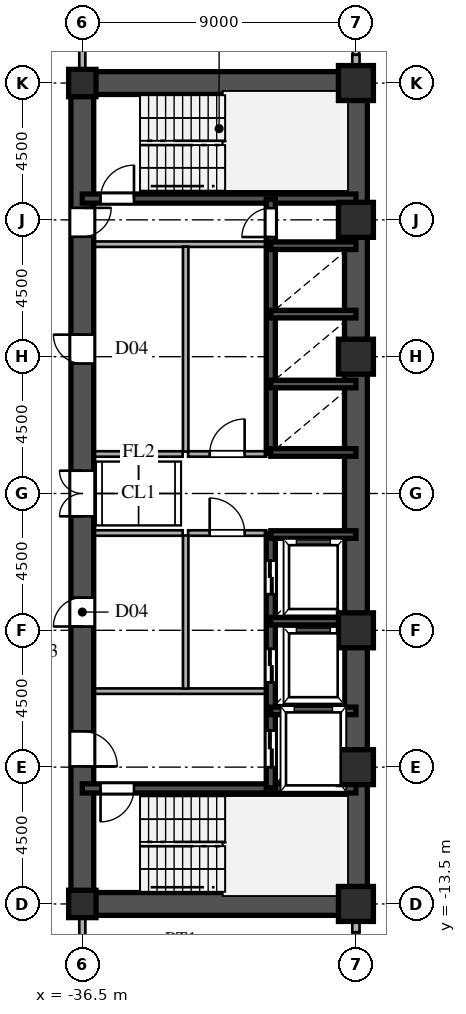
"""IFC4 building model, lengths in metres.
Left out: names, types, materials, properties, quantities, classifications, styles, units other than length and angle.
Written with IfcOpenShell. Run it as: python <this file> out.ifc"""

import sys

from ifc_helpers import new_model, si_unit, direction, frame, frame_2d, origin, origin_2d, place, context, subcontext, project, spatial, rectangle, hollow_rectangle, i_section, extrude, source, transform, mapped, element, fill, save


model = new_model("IFC4")
c1 = context("Model", 3, precision=1e-05, world=origin(), true_north=direction((0.0, 1.0)))
c2 = subcontext(c1, "Body", "Model", "MODEL_VIEW")
j1 = project(units=[si_unit("LENGTHUNIT", "METRE"), si_unit("PLANEANGLEUNIT", "RADIAN")], contexts=[c1])
p1 = place(None, origin())
s1 = spatial("IfcSite", under=j1, at=p1, CompositionType="ELEMENT")
p2 = place(p1, origin())
s2 = spatial("IfcBuilding", under=s1, at=p2, CompositionType="ELEMENT")
p3 = place(p2, frame((0.0, 0.0, 40.5)))
s3 = spatial("IfcBuildingStorey", under=s2, at=p3, CompositionType="ELEMENT", Elevation=40.5)
m1 = source(origin(), c2, "Body", "SweptSolid", [
    extrude(hollow_rectangle(XDim=1.15, YDim=1.15, WallThickness=0.048, at=origin_2d()), origin(), (0.0, 0.0, 1.0), 3.6),
])
for number, where, z_axis, x_axis in (
    (1, (-27.5, -13.5, 0.0), (0.0, 0.0, 1.0), (1.0, 0.0, 0.0)),
    (2, (-27.5, -9.0, 0.0), (0.0, 0.0, 1.0), (1.0, 0.0, 0.0)),
    (3, (-27.5, -4.5, 0.0), (0.0, 0.0, 1.0), (1.0, 0.0, 0.0)),
    (4, (-27.5, 4.5, 0.0), (0.0, 0.0, 1.0), (1.0, 0.0, 0.0)),
    (5, (-27.5, 9.0, 0.0), (0.0, 0.0, 1.0), (1.0, 0.0, 0.0)),
    (6, (-27.5, 13.5, 0.0), (0.0, 0.0, 1.0), (1.0, 0.0, 0.0)),
):
    element("IfcColumn", number, at=place(p3, frame(where, z_axis=z_axis, x_axis=x_axis)), inside=s3, PredefinedType="COLUMN", context=c2, shape_type="MappedRepresentation", body=[
        mapped(m1, transform((0.0, 0.0, 0.0), scale=1.0)),
    ])
m2 = source(origin(), c2, "Body", "SweptSolid", [
    extrude(i_section(OverallWidth=0.9, OverallDepth=0.9, WebThickness=0.036, FlangeThickness=0.055, at=origin_2d()), origin(), (0.0, 0.0, 1.0), 3.6),
])
for number, where, z_axis, x_axis in (
    (7, (-36.5, -13.5, 0.0), (0.0, 0.0, 1.0), (1.0, 0.0, 0.0)),
    (8, (-36.5, 13.5, 0.0), (0.0, 0.0, 1.0), (1.0, 0.0, 0.0)),
):
    element("IfcColumn", number, at=place(p3, frame(where, z_axis=z_axis, x_axis=x_axis)), inside=s3, PredefinedType="COLUMN", context=c2, shape_type="MappedRepresentation", body=[
        mapped(m2, transform((0.0, 0.0, 0.0), scale=1.0)),
    ])
for number, where, z_axis, x_axis in (
    (9, (-27.5, -14.43, 0.0), (0.0, 0.0, 1.0), (0.0, 1.0, 0.0)),
    (10, (-27.5, 13.88, 0.0), (0.0, 0.0, 1.0), (0.0, 1.0, 0.0)),
):
    element("IfcWall", number, at=place(p3, frame(where, z_axis=z_axis, x_axis=x_axis)), inside=s3, PredefinedType="SOLIDWALL", context=c2, shape_type="SweptSolid", body=[
        extrude(rectangle(XDim=0.55, YDim=0.24, at=frame_2d((0.275, 0.0))), origin(), (0.0, 0.0, 1.0), 2.88),
    ])
for number, where, z_axis, x_axis in (
    (11, (-27.5, -13.5, 0.0), (0.0, 0.0, 1.0), (0.0, 1.0, 0.0)),
    (12, (-27.5, 1.3, 0.0), (0.0, 0.0, 1.0), (0.0, 1.0, 0.0)),
):
    element("IfcWall", number, at=place(p3, frame(where, z_axis=z_axis, x_axis=x_axis)), inside=s3, PredefinedType="SHEAR", context=c2, shape_type="SweptSolid", body=[
        extrude(rectangle(XDim=12.2, YDim=0.75, at=frame_2d((6.1, 0.0))), origin(), (0.0, 0.0, 1.0), 3.38),
    ])
p4 = place(p3, frame((-27.5, -1.3, 0.0), z_axis=(0.0, 0.0, 1.0), x_axis=(0.0, 1.0, 0.0)))
e13 = element("IfcWall", 13, at=p4, inside=s3, PredefinedType="SHEAR", context=c2, shape_type="SweptSolid", body=[
    extrude(rectangle(XDim=2.6, YDim=0.75, at=frame_2d((1.3, 0.0))), origin(), (0.0, 0.0, 1.0), 3.38),
])
for number, where, z_axis, x_axis in (
    (14, (-36.5, -13.5, 0.0), (0.0, 0.0, 1.0), (1.0, 0.0, 0.0)),
    (15, (-36.5, 13.5, 0.0), (0.0, 0.0, 1.0), (1.0, 0.0, 0.0)),
):
    element("IfcWall", number, at=place(p3, frame(where, z_axis=z_axis, x_axis=x_axis)), inside=s3, PredefinedType="SHEAR", context=c2, shape_type="SweptSolid", body=[
        extrude(rectangle(XDim=9.0, YDim=0.75, at=frame_2d((4.5, 0.0))), origin(), (0.0, 0.0, 1.0), 3.38),
    ])
p5 = place(p3, frame((-36.5, -13.65, 0.0), z_axis=(0.0, 0.0, 1.0), x_axis=(0.0, 1.0, 0.0)))
e16 = element("IfcWall", 16, at=p5, inside=s3, PredefinedType="SHEAR", context=c2, shape_type="SweptSolid", body=[
    extrude(rectangle(XDim=7.15, YDim=0.75, at=frame_2d((3.575, 0.0))), origin(), (0.0, 0.0, 1.0), 3.38),
])
p6 = place(p5, frame((4.675, 0.0, 0.0)))
e17 = element("IfcOpeningElement", 17, at=p6, cuts=e16, PredefinedType="OPENING", context=c2, shape_type="SweptSolid", body=[
    extrude(rectangle(XDim=1.15, YDim=2.2, at=frame_2d((0.575, 1.1))), frame((0.0, 0.385, 0.0), z_axis=(0.0, -1.0, 0.0), x_axis=(1.0, 0.0, 0.0)), (0.0, 0.0, 1.0), 0.77),
])
p7 = place(p3, frame((-36.5, -1.3, 0.0), z_axis=(0.0, 0.0, 1.0), x_axis=(0.0, 1.0, 0.0)))
e18 = element("IfcWall", 18, at=p7, inside=s3, PredefinedType="SHEAR", context=c2, shape_type="SweptSolid", body=[
    extrude(rectangle(XDim=2.6, YDim=0.75, at=frame_2d((1.3, 0.0))), origin(), (0.0, 0.0, 1.0), 3.38),
])
p8 = place(p7, frame((0.55, 0.0, 0.0)))
e19 = element("IfcOpeningElement", 19, at=p8, cuts=e18, PredefinedType="OPENING", context=c2, shape_type="SweptSolid", body=[
    extrude(rectangle(XDim=1.5, YDim=2.3, at=frame_2d((0.75, 1.15))), frame((0.0, 0.385, 0.0), z_axis=(0.0, -1.0, 0.0), x_axis=(1.0, 0.0, 0.0)), (0.0, 0.0, 1.0), 0.77),
])
p9 = place(p3, frame((-36.5, 8.2, 0.0), z_axis=(0.0, 0.0, 1.0), x_axis=(0.0, 1.0, 0.0)))
e20 = element("IfcWall", 20, at=p9, inside=s3, PredefinedType="SHEAR", context=c2, shape_type="SweptSolid", body=[
    extrude(rectangle(XDim=5.45, YDim=0.75, at=frame_2d((2.725, 0.0))), origin(), (0.0, 0.0, 1.0), 3.38),
])
p10 = place(p9, frame((0.245, 0.0, 0.0)))
e21 = element("IfcOpeningElement", 21, at=p10, cuts=e20, PredefinedType="OPENING", context=c2, shape_type="SweptSolid", body=[
    extrude(rectangle(XDim=0.95, YDim=2.15, at=frame_2d((0.475, 1.075))), frame((0.0, 0.385, 0.0), z_axis=(0.0, -1.0, 0.0), x_axis=(1.0, 0.0, 0.0)), (0.0, 0.0, 1.0), 0.77),
])
p11 = place(p3, frame((-36.5, -6.5, 0.0), z_axis=(0.0, 0.0, 1.0), x_axis=(0.0, 1.0, 0.0)))
e22 = element("IfcWall", 22, at=p11, inside=s3, PredefinedType="SHEAR", context=c2, shape_type="SweptSolid", body=[
    extrude(rectangle(XDim=5.2, YDim=0.75, at=frame_2d((2.6, 0.0))), origin(), (0.0, 0.0, 1.0), 3.38),
])
p12 = place(p11, frame((2.125, 0.0, 0.0)))
e23 = element("IfcOpeningElement", 23, at=p12, cuts=e22, PredefinedType="OPENING", context=c2, shape_type="SweptSolid", body=[
    extrude(rectangle(XDim=0.95, YDim=2.15, at=frame_2d((0.475, 1.075))), frame((0.0, 0.385, 0.0), z_axis=(0.0, -1.0, 0.0), x_axis=(1.0, 0.0, 0.0)), (0.0, 0.0, 1.0), 0.77),
])
p13 = place(p3, frame((-36.5, 1.3, 0.0), z_axis=(0.0, 0.0, 1.0), x_axis=(0.0, 1.0, 0.0)))
e24 = element("IfcWall", 24, at=p13, inside=s3, PredefinedType="SHEAR", context=c2, shape_type="SweptSolid", body=[
    extrude(rectangle(XDim=6.9, YDim=0.75, at=frame_2d((3.45, 0.0))), origin(), (0.0, 0.0, 1.0), 3.38),
])
p14 = place(p13, frame((2.975, 0.0, 0.0)))
e25 = element("IfcOpeningElement", 25, at=p14, cuts=e24, PredefinedType="OPENING", context=c2, shape_type="SweptSolid", body=[
    extrude(rectangle(XDim=0.95, YDim=2.15, at=frame_2d((0.475, 1.075))), frame((0.0, 0.385, 0.0), z_axis=(0.0, -1.0, 0.0), x_axis=(1.0, 0.0, 0.0)), (0.0, 0.0, 1.0), 0.77),
])
p15 = place(p3, frame((-36.5, -9.7, 0.0), z_axis=(0.0, 0.0, 1.0), x_axis=(1.0, 0.0, 0.0)))
e26 = element("IfcWall", 26, at=p15, inside=s3, PredefinedType="SHEAR", context=c2, shape_type="SweptSolid", body=[
    extrude(rectangle(XDim=9.0, YDim=0.3, at=frame_2d((4.5, 0.0))), origin(), (0.0, 0.0, 1.0), 3.38),
])
p16 = place(p15, frame((0.6, 0.0, 0.0)))
e27 = element("IfcOpeningElement", 27, at=p16, cuts=e26, PredefinedType="OPENING", context=c2, shape_type="SweptSolid", body=[
    extrude(rectangle(XDim=1.1, YDim=2.2, at=frame_2d((0.55, 1.1))), frame((0.0, 0.16, 0.0), z_axis=(0.0, -1.0, 0.0), x_axis=(1.0, 0.0, 0.0)), (0.0, 0.0, 1.0), 0.32),
])
p17 = place(p3, frame((-36.5, 9.7, 0.0), z_axis=(0.0, 0.0, 1.0), x_axis=(1.0, 0.0, 0.0)))
e28 = element("IfcWall", 28, at=p17, inside=s3, PredefinedType="SHEAR", context=c2, shape_type="SweptSolid", body=[
    extrude(rectangle(XDim=9.0, YDim=0.3, at=frame_2d((4.5, 0.0))), origin(), (0.0, 0.0, 1.0), 3.38),
])
p18 = place(p17, frame((0.6, 0.0, 0.0)))
e29 = element("IfcOpeningElement", 29, at=p18, cuts=e28, PredefinedType="OPENING", context=c2, shape_type="SweptSolid", body=[
    extrude(rectangle(XDim=1.1, YDim=2.2, at=frame_2d((0.55, 1.1))), frame((0.0, 0.16, 0.0), z_axis=(0.0, -1.0, 0.0), x_axis=(1.0, 0.0, 0.0)), (0.0, 0.0, 1.0), 0.32),
])
for number, where, z_axis, x_axis in (
    (30, (-30.3, -7.15, 0.0), (0.0, 0.0, 1.0), (1.0, 0.0, 0.0)),
    (31, (-30.3, -4.2, 0.0), (0.0, 0.0, 1.0), (1.0, 0.0, 0.0)),
    (32, (-30.3, -1.35, 0.0), (0.0, 0.0, 1.0), (1.0, 0.0, 0.0)),
    (33, (-30.3, 1.35, 0.0), (0.0, 0.0, 1.0), (1.0, 0.0, 0.0)),
    (34, (-30.3, 3.6, 0.0), (0.0, 0.0, 1.0), (1.0, 0.0, 0.0)),
    (35, (-30.3, 5.9, 0.0), (0.0, 0.0, 1.0), (1.0, 0.0, 0.0)),
    (36, (-30.3, 8.15, 0.0), (0.0, 0.0, 1.0), (1.0, 0.0, 0.0)),
):
    element("IfcWall", number, at=place(p3, frame(where, z_axis=z_axis, x_axis=x_axis)), inside=s3, PredefinedType="SHEAR", context=c2, shape_type="SweptSolid", body=[
        extrude(rectangle(XDim=2.8, YDim=0.25, at=frame_2d((1.4, 0.0))), origin(), (0.0, 0.0, 1.0), 3.38),
    ])
p19 = place(p3, frame((-30.3, -9.68, 0.0), z_axis=(0.0, 0.0, 1.0), x_axis=(0.0, 1.0, 0.0)))
e37 = element("IfcWall", 37, at=p19, inside=s3, PredefinedType="SHEAR", context=c2, shape_type="SweptSolid", body=[
    extrude(rectangle(XDim=2.56, YDim=0.3, at=frame_2d((1.28, 0.0))), origin(), (0.0, 0.0, 1.0), 3.38),
])
p20 = place(p19, frame((0.68, 0.0, 0.0)))
e38 = element("IfcOpeningElement", 38, at=p20, cuts=e37, PredefinedType="OPENING", context=c2, shape_type="SweptSolid", body=[
    extrude(rectangle(XDim=1.2, YDim=2.25, at=frame_2d((0.6, 1.125))), frame((0.0, 0.16, 0.0), z_axis=(0.0, -1.0, 0.0), x_axis=(1.0, 0.0, 0.0)), (0.0, 0.0, 1.0), 0.32),
])
p21 = place(p3, frame((-30.3, -7.12, 0.0), z_axis=(0.0, 0.0, 1.0), x_axis=(0.0, 1.0, 0.0)))
e39 = element("IfcWall", 39, at=p21, inside=s3, PredefinedType="SHEAR", context=c2, shape_type="SweptSolid", body=[
    extrude(rectangle(XDim=2.92, YDim=0.3, at=frame_2d((1.46, 0.0))), origin(), (0.0, 0.0, 1.0), 3.38),
])
p22 = place(p21, frame((0.91, 0.0, 0.0)))
e40 = element("IfcOpeningElement", 40, at=p22, cuts=e39, PredefinedType="OPENING", context=c2, shape_type="SweptSolid", body=[
    extrude(rectangle(XDim=1.1, YDim=2.2, at=frame_2d((0.55, 1.1))), frame((0.0, 0.16, 0.0), z_axis=(0.0, -1.0, 0.0), x_axis=(1.0, 0.0, 0.0)), (0.0, 0.0, 1.0), 0.32),
])
p23 = place(p3, frame((-30.3, -4.2, 0.0), z_axis=(0.0, 0.0, 1.0), x_axis=(0.0, 1.0, 0.0)))
e41 = element("IfcWall", 41, at=p23, inside=s3, PredefinedType="SHEAR", context=c2, shape_type="SweptSolid", body=[
    extrude(rectangle(XDim=2.88, YDim=0.3, at=frame_2d((1.44, 0.0))), origin(), (0.0, 0.0, 1.0), 3.38),
])
p24 = place(p23, frame((0.89, 0.0, 0.0)))
e42 = element("IfcOpeningElement", 42, at=p24, cuts=e41, PredefinedType="OPENING", context=c2, shape_type="SweptSolid", body=[
    extrude(rectangle(XDim=1.1, YDim=2.2, at=frame_2d((0.55, 1.1))), frame((0.0, 0.16, 0.0), z_axis=(0.0, -1.0, 0.0), x_axis=(1.0, 0.0, 0.0)), (0.0, 0.0, 1.0), 0.32),
])
p25 = place(p3, frame((-30.3, 1.32, 0.0), z_axis=(0.0, 0.0, 1.0), x_axis=(0.0, 1.0, 0.0)))
e43 = element("IfcWall", 43, at=p25, inside=s3, PredefinedType="SHEAR", context=c2, shape_type="SweptSolid", body=[
    extrude(rectangle(XDim=2.28, YDim=0.3, at=frame_2d((1.14, 0.0))), origin(), (0.0, 0.0, 1.0), 3.38),
])
p26 = place(p3, frame((-30.3, 3.6, 0.0), z_axis=(0.0, 0.0, 1.0), x_axis=(0.0, 1.0, 0.0)))
e44 = element("IfcWall", 44, at=p26, inside=s3, PredefinedType="SHEAR", context=c2, shape_type="SweptSolid", body=[
    extrude(rectangle(XDim=2.3, YDim=0.3, at=frame_2d((1.15, 0.0))), origin(), (0.0, 0.0, 1.0), 3.38),
])
p27 = place(p3, frame((-30.3, 5.9, 0.0), z_axis=(0.0, 0.0, 1.0), x_axis=(0.0, 1.0, 0.0)))
e45 = element("IfcWall", 45, at=p27, inside=s3, PredefinedType="SHEAR", context=c2, shape_type="SweptSolid", body=[
    extrude(rectangle(XDim=2.25, YDim=0.3, at=frame_2d((1.125, 0.0))), origin(), (0.0, 0.0, 1.0), 3.38),
])
p28 = place(p3, frame((-30.3, 8.15, 0.0), z_axis=(0.0, 0.0, 1.0), x_axis=(0.0, 1.0, 0.0)))
e46 = element("IfcWall", 46, at=p28, inside=s3, PredefinedType="SHEAR", context=c2, shape_type="SweptSolid", body=[
    extrude(rectangle(XDim=1.53, YDim=0.3, at=frame_2d((0.765, 0.0))), origin(), (0.0, 0.0, 1.0), 3.38),
])
p29 = place(p28, frame((0.285, 0.0, 0.0)))
e47 = element("IfcOpeningElement", 47, at=p29, cuts=e46, PredefinedType="OPENING", context=c2, shape_type="SweptSolid", body=[
    extrude(rectangle(XDim=0.95, YDim=2.15, at=frame_2d((0.475, 1.075))), frame((0.0, 0.16, 0.0), z_axis=(0.0, -1.0, 0.0), x_axis=(1.0, 0.0, 0.0)), (0.0, 0.0, 1.0), 0.32),
])
for number, where, z_axis, x_axis in (
    (48, (-36.15, -6.5, 0.0), (0.0, 0.0, 1.0), (1.0, 0.0, 0.0)),
    (49, (-36.15, 8.2, 0.0), (0.0, 0.0, 1.0), (1.0, 0.0, 0.0)),
):
    element("IfcWall", number, at=place(p3, frame(where, z_axis=z_axis, x_axis=x_axis)), inside=s3, PredefinedType="PARTITIONING", context=c2, shape_type="SweptSolid", body=[
        extrude(rectangle(XDim=5.7, YDim=0.18, at=frame_2d((2.85, 0.0))), origin(), (0.0, 0.0, 1.0), 3.38),
    ])
p30 = place(p3, frame((-33.1, -6.42, 0.0), z_axis=(0.0, 0.0, 1.0), x_axis=(0.0, 1.0, 0.0)))
e50 = element("IfcWall", 50, at=p30, inside=s3, PredefinedType="PARTITIONING", context=c2, shape_type="SweptSolid", body=[
    extrude(rectangle(XDim=5.04, YDim=0.18, at=frame_2d((2.52, 0.0))), origin(), (0.0, 0.0, 1.0), 3.38),
])
p31 = place(p3, frame((-33.1, 1.38, 0.0), z_axis=(0.0, 0.0, 1.0), x_axis=(0.0, 1.0, 0.0)))
e51 = element("IfcWall", 51, at=p31, inside=s3, PredefinedType="PARTITIONING", context=c2, shape_type="SweptSolid", body=[
    extrude(rectangle(XDim=6.74, YDim=0.18, at=frame_2d((3.37, 0.0))), origin(), (0.0, 0.0, 1.0), 3.38),
])
p32 = place(p3, frame((-33.02, -1.3, 0.0), z_axis=(0.0, 0.0, 1.0), x_axis=(1.0, 0.0, 0.0)))
e52 = element("IfcWall", 52, at=p32, inside=s3, PredefinedType="PARTITIONING", context=c2, shape_type="SweptSolid", body=[
    extrude(rectangle(XDim=2.57, YDim=0.18, at=frame_2d((1.285, 0.0))), origin(), (0.0, 0.0, 1.0), 3.38),
])
p33 = place(p32, frame((0.71, 0.0, 0.0)))
e53 = element("IfcOpeningElement", 53, at=p33, cuts=e52, PredefinedType="OPENING", context=c2, shape_type="SweptSolid", body=[
    extrude(rectangle(XDim=1.15, YDim=2.2, at=frame_2d((0.575, 1.1))), frame((0.0, 0.1, 0.0), z_axis=(0.0, -1.0, 0.0), x_axis=(1.0, 0.0, 0.0)), (0.0, 0.0, 1.0), 0.2),
])
p34 = place(p3, frame((-33.02, 1.3, 0.0), z_axis=(0.0, 0.0, 1.0), x_axis=(1.0, 0.0, 0.0)))
e54 = element("IfcWall", 54, at=p34, inside=s3, PredefinedType="PARTITIONING", context=c2, shape_type="SweptSolid", body=[
    extrude(rectangle(XDim=2.57, YDim=0.18, at=frame_2d((1.285, 0.0))), origin(), (0.0, 0.0, 1.0), 3.38),
])
p35 = place(p34, frame((0.71, 0.0, 0.0)))
e55 = element("IfcOpeningElement", 55, at=p35, cuts=e54, PredefinedType="OPENING", context=c2, shape_type="SweptSolid", body=[
    extrude(rectangle(XDim=1.15, YDim=2.2, at=frame_2d((0.575, 1.1))), frame((0.0, 0.1, 0.0), z_axis=(0.0, -1.0, 0.0), x_axis=(1.0, 0.0, 0.0)), (0.0, 0.0, 1.0), 0.2),
])
for number, where, z_axis, x_axis in (
    (56, (-36.15, -1.3, 0.0), (0.0, 0.0, 1.0), (1.0, 0.0, 0.0)),
    (57, (-36.15, 1.3, 0.0), (0.0, 0.0, 1.0), (1.0, 0.0, 0.0)),
):
    element("IfcWall", number, at=place(p3, frame(where, z_axis=z_axis, x_axis=x_axis)), inside=s3, PredefinedType="PARTITIONING", context=c2, shape_type="SweptSolid", body=[
        extrude(rectangle(XDim=2.95, YDim=0.18, at=frame_2d((1.475, 0.0))), origin(), (0.0, 0.0, 1.0), 3.38),
    ])
for number, where, z_axis, x_axis in (
    (58, (-36.5, -15.515, 0.0), (0.0, 0.0, 1.0), (0.0, 1.0, 0.0)),
    (59, (-36.5, 13.88, 0.0), (0.0, 0.0, 1.0), (0.0, 1.0, 0.0)),
):
    element("IfcWall", number, at=place(p3, frame(where, z_axis=z_axis, x_axis=x_axis)), inside=s3, PredefinedType="PARTITIONING", context=c2, shape_type="SweptSolid", body=[
        extrude(rectangle(XDim=1.635, YDim=0.2, at=frame_2d((0.817, 0.0))), origin(), (0.0, 0.0, 1.0), 2.68),
    ])
m3 = source(origin(), c2, "Body", "SweptSolid", [
    extrude(rectangle(XDim=1.15, YDim=2.2, at=frame_2d((0.575, 1.1))), frame((0.0, 0.025, 0.0), z_axis=(0.0, -1.0, 0.0), x_axis=(1.0, 0.0, 0.0)), (0.0, 0.0, 1.0), 0.05),
])
p36 = place(p6, frame((1.15, 0.0, 0.0), z_axis=(0.0, 0.0, 1.0), x_axis=(-1.0, 0.0, 0.0)))
e60 = element("IfcDoor", 60, at=p36, inside=s3, OperationType="SINGLE_SWING_LEFT", PredefinedType="DOOR", context=c2, shape_type="MappedRepresentation", body=[
    mapped(m3, transform((0.0, 0.0, 0.0), scale=1.0)),
])
fill(e17, e60)
m4 = source(origin(), c2, "Body", "SweptSolid", [
    extrude(rectangle(XDim=1.5, YDim=2.3, at=frame_2d((0.75, 1.15))), frame((0.0, 0.025, 0.0), z_axis=(0.0, -1.0, 0.0), x_axis=(1.0, 0.0, 0.0)), (0.0, 0.0, 1.0), 0.05),
])
p37 = place(p8, origin())
e61 = element("IfcDoor", 61, at=p37, inside=s3, OperationType="DOUBLE_SWING_LEFT", PredefinedType="DOOR", context=c2, shape_type="MappedRepresentation", body=[
    mapped(m4, transform((0.0, 0.0, 0.0), scale=1.0)),
])
fill(e19, e61)
m5 = source(origin(), c2, "Body", "SweptSolid", [
    extrude(rectangle(XDim=0.95, YDim=2.15, at=frame_2d((0.475, 1.075))), frame((0.0, 0.025, 0.0), z_axis=(0.0, -1.0, 0.0), x_axis=(1.0, 0.0, 0.0)), (0.0, 0.0, 1.0), 0.05),
])
p38 = place(p10, frame((0.95, 0.0, 0.0), z_axis=(0.0, 0.0, 1.0), x_axis=(-1.0, 0.0, 0.0)))
e62 = element("IfcDoor", 62, at=p38, inside=s3, OperationType="SINGLE_SWING_RIGHT", PredefinedType="DOOR", context=c2, shape_type="MappedRepresentation", body=[
    mapped(m5, transform((0.0, 0.0, 0.0), scale=1.0)),
])
fill(e21, e62)
p39 = place(p12, origin())
e63 = element("IfcDoor", 63, at=p39, inside=s3, OperationType="SINGLE_SWING_LEFT", PredefinedType="DOOR", context=c2, shape_type="MappedRepresentation", body=[
    mapped(m5, transform((0.0, 0.0, 0.0), scale=1.0)),
])
fill(e23, e63)
p40 = place(p14, origin())
e64 = element("IfcDoor", 64, at=p40, inside=s3, OperationType="SINGLE_SWING_RIGHT", PredefinedType="DOOR", context=c2, shape_type="MappedRepresentation", body=[
    mapped(m5, transform((0.0, 0.0, 0.0), scale=1.0)),
])
fill(e25, e64)
m6 = source(origin(), c2, "Body", "SweptSolid", [
    extrude(rectangle(XDim=1.1, YDim=2.2, at=frame_2d((0.55, 1.1))), frame((0.0, 0.025, 0.0), z_axis=(0.0, -1.0, 0.0), x_axis=(1.0, 0.0, 0.0)), (0.0, 0.0, 1.0), 0.05),
])
p41 = place(p16, frame((1.1, 0.0, 0.0), z_axis=(0.0, 0.0, 1.0), x_axis=(-1.0, 0.0, 0.0)))
e65 = element("IfcDoor", 65, at=p41, inside=s3, OperationType="SINGLE_SWING_LEFT", PredefinedType="DOOR", context=c2, shape_type="MappedRepresentation", body=[
    mapped(m6, transform((0.0, 0.0, 0.0), scale=1.0)),
])
fill(e27, e65)
p42 = place(p18, origin())
e66 = element("IfcDoor", 66, at=p42, inside=s3, OperationType="SINGLE_SWING_RIGHT", PredefinedType="DOOR", context=c2, shape_type="MappedRepresentation", body=[
    mapped(m6, transform((0.0, 0.0, 0.0), scale=1.0)),
])
fill(e29, e66)
m7 = source(origin(), c2, "Body", "SweptSolid", [
    extrude(rectangle(XDim=1.2, YDim=2.25, at=frame_2d((0.6, 1.125))), frame((0.0, 0.025, 0.0), z_axis=(0.0, -1.0, 0.0), x_axis=(1.0, 0.0, 0.0)), (0.0, 0.0, 1.0), 0.05),
])
p43 = place(p20, origin())
e67 = element("IfcDoor", 67, at=p43, inside=s3, OperationType="DOUBLE_DOOR_SLIDING", PredefinedType="DOOR", context=c2, shape_type="MappedRepresentation", body=[
    mapped(m7, transform((0.0, 0.0, 0.0), scale=1.0)),
])
fill(e38, e67)
m8 = source(origin(), c2, "Body", "SweptSolid", [
    extrude(rectangle(XDim=1.1, YDim=2.2, at=frame_2d((0.55, 1.1))), frame((0.0, 0.025, 0.0), z_axis=(0.0, -1.0, 0.0), x_axis=(1.0, 0.0, 0.0)), (0.0, 0.0, 1.0), 0.05),
])
p44 = place(p22, origin())
e68 = element("IfcDoor", 68, at=p44, inside=s3, OperationType="DOUBLE_DOOR_SLIDING", PredefinedType="DOOR", context=c2, shape_type="MappedRepresentation", body=[
    mapped(m8, transform((0.0, 0.0, 0.0), scale=1.0)),
])
fill(e40, e68)
p45 = place(p24, origin())
e69 = element("IfcDoor", 69, at=p45, inside=s3, OperationType="DOUBLE_DOOR_SLIDING", PredefinedType="DOOR", context=c2, shape_type="MappedRepresentation", body=[
    mapped(m8, transform((0.0, 0.0, 0.0), scale=1.0)),
])
fill(e42, e69)
p46 = place(p29, origin())
e70 = element("IfcDoor", 70, at=p46, inside=s3, OperationType="SINGLE_SWING_LEFT", PredefinedType="DOOR", context=c2, shape_type="MappedRepresentation", body=[
    mapped(m5, transform((0.0, 0.0, 0.0), scale=1.0)),
])
fill(e47, e70)
p47 = place(p33, origin())
e71 = element("IfcDoor", 71, at=p47, inside=s3, OperationType="SINGLE_SWING_LEFT", PredefinedType="DOOR", context=c2, shape_type="MappedRepresentation", body=[
    mapped(m3, transform((0.0, 0.0, 0.0), scale=1.0)),
])
fill(e53, e71)
p48 = place(p35, origin())
e72 = element("IfcDoor", 72, at=p48, inside=s3, OperationType="SINGLE_SWING_RIGHT", PredefinedType="DOOR", context=c2, shape_type="MappedRepresentation", body=[
    mapped(m3, transform((0.0, 0.0, 0.0), scale=1.0)),
])
fill(e55, e72)
save(model, sys.argv[1])
